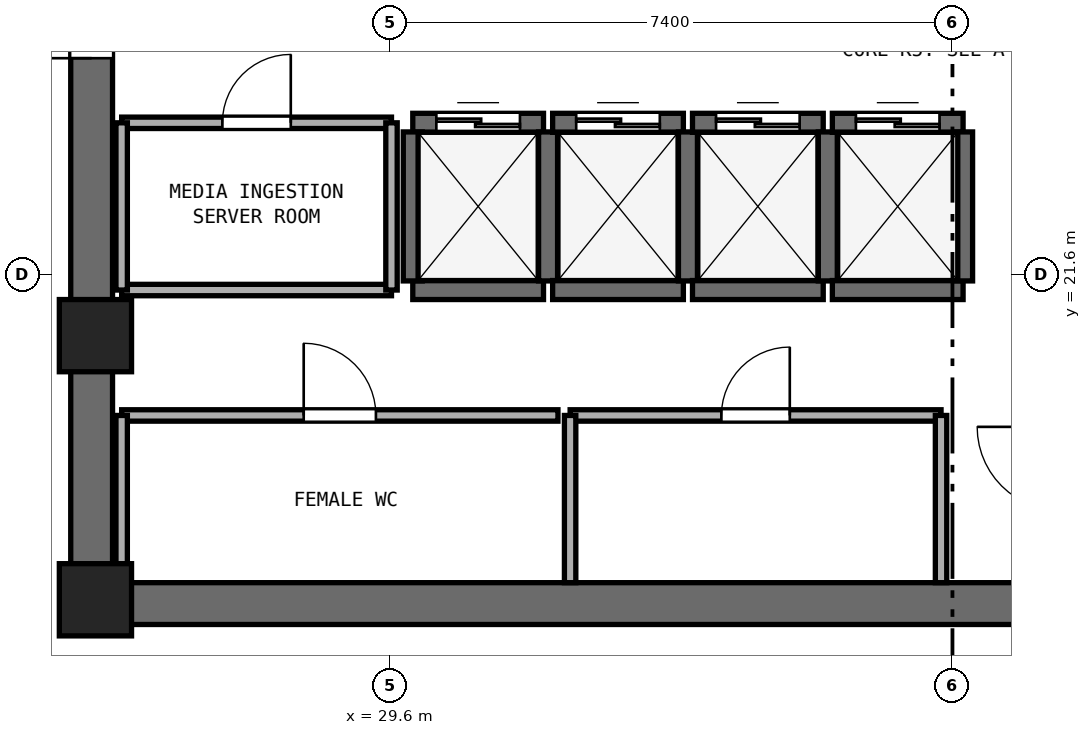
"""IFC4 building model, lengths in metres.
Left out: names, types, materials, properties, quantities, classifications, styles, units other than length and angle.
Written with IfcOpenShell. Run it as: python <this file> out.ifc"""

import sys

from ifc_helpers import new_model, si_unit, direction, frame, frame_2d, origin, origin_2d, place, context, subcontext, project, spatial, rectangle, extrude, element, fill, save


model = new_model("IFC4")
c1 = context("Model", 3, precision=1e-05, world=origin(), true_north=direction((0.0, 1.0)))
c2 = subcontext(c1, "Body", "Model", "MODEL_VIEW")
j1 = project(units=[si_unit("LENGTHUNIT", "METRE"), si_unit("PLANEANGLEUNIT", "RADIAN")], contexts=[c1])
p1 = place(None, origin())
s1 = spatial("IfcSite", under=j1, at=p1, CompositionType="ELEMENT")
p2 = place(p1, origin())
s2 = spatial("IfcBuilding", under=s1, at=p2, CompositionType="ELEMENT")
p3 = place(p2, frame((0.0, 0.0, 136.4)))
s3 = spatial("IfcBuildingStorey", under=s2, at=p3, CompositionType="ELEMENT", Elevation=136.4)
p4 = place(p3, frame((25.4, 17.275, 0.0), z_axis=(0.0, 0.0, 1.0), x_axis=(1.0, 0.0, 0.0)))
e1 = element("IfcWall", 1, at=p4, inside=s3, PredefinedType="SHEAR", context=c2, shape_type="SweptSolid", body=[
    extrude(rectangle(XDim=23.2, YDim=0.55, at=frame_2d((11.6, 0.0))), origin(), (0.0, 0.0, 1.0), 3.54),
])
p5 = place(p3, frame((25.675, 17.55, 0.0), z_axis=(0.0, 0.0, 1.0), x_axis=(0.0, 1.0, 0.0)))
e2 = element("IfcWall", 2, at=p5, inside=s3, PredefinedType="SHEAR", context=c2, shape_type="SweptSolid", body=[
    extrude(rectangle(XDim=15.3, YDim=0.55, at=frame_2d((7.65, 0.0))), origin(), (0.0, 0.0, 1.0), 3.54),
])
p6 = place(p5, frame((6.9, 0.0, 0.0)))
e3 = element("IfcOpeningElement", 3, at=p6, cuts=e2, PredefinedType="OPENING", context=c2, shape_type="SweptSolid", body=[
    extrude(rectangle(XDim=1.5, YDim=2.15, at=frame_2d((0.75, 1.075))), frame((0.0, 0.285, 0.0), z_axis=(0.0, -1.0, 0.0), x_axis=(1.0, 0.0, 0.0)), (0.0, 0.0, 1.0), 0.57),
])
for number, where, z_axis, x_axis in (
    (4, (25.725, 17.325, 0.0), (0.0, 0.0, 1.0), (1.0, 0.0, 0.0)),
    (5, (25.725, 20.8, 0.0), (0.0, 0.0, 1.0), (1.0, 0.0, 0.0)),
):
    element("IfcColumn", number, at=place(p3, frame(where, z_axis=z_axis, x_axis=x_axis)), inside=s3, PredefinedType="PILASTER", context=c2, shape_type="SweptSolid", body=[
        extrude(rectangle(XDim=0.95, YDim=0.95, at=origin_2d()), origin(), (0.0, 0.0, 1.0), 3.8),
    ])
p7 = place(p3, frame((29.9, 21.4, 0.0), z_axis=(0.0, 0.0, 1.0), x_axis=(1.0, 0.0, 0.0)))
e6 = element("IfcWall", 6, at=p7, inside=s3, PredefinedType="SHEAR", context=c2, shape_type="SweptSolid", body=[
    extrude(rectangle(XDim=1.72, YDim=0.25, at=frame_2d((0.86, 0.0))), origin(), (0.0, 0.0, 1.0), 3.54),
])
p8 = place(p3, frame((29.9, 23.6, 0.0), z_axis=(0.0, 0.0, 1.0), x_axis=(1.0, 0.0, 0.0)))
e7 = element("IfcWall", 7, at=p8, inside=s3, PredefinedType="SHEAR", context=c2, shape_type="SweptSolid", body=[
    extrude(rectangle(XDim=1.72, YDim=0.25, at=frame_2d((0.86, 0.0))), origin(), (0.0, 0.0, 1.0), 3.54),
])
p9 = place(p8, frame((0.31, 0.0, 0.0)))
e8 = element("IfcOpeningElement", 8, at=p9, cuts=e7, PredefinedType="OPENING", context=c2, shape_type="SweptSolid", body=[
    extrude(rectangle(XDim=1.1, YDim=2.15, at=frame_2d((0.55, 1.075))), frame((0.0, 0.135, 0.0), z_axis=(0.0, -1.0, 0.0), x_axis=(1.0, 0.0, 0.0)), (0.0, 0.0, 1.0), 0.27),
])
for number, where, z_axis, x_axis in (
    (9, (29.9, 21.52, 0.0), (0.0, 0.0, 1.0), (0.0, 1.0, 0.0)),
    (10, (31.68, 21.52, 0.0), (0.0, 0.0, 1.0), (0.0, 1.0, 0.0)),
):
    element("IfcWall", number, at=place(p3, frame(where, z_axis=z_axis, x_axis=x_axis)), inside=s3, PredefinedType="SHEAR", context=c2, shape_type="SweptSolid", body=[
        extrude(rectangle(XDim=1.96, YDim=0.25, at=frame_2d((0.98, 0.0))), origin(), (0.0, 0.0, 1.0), 3.54),
    ])
p10 = place(p3, frame((31.74, 21.4, 0.0), z_axis=(0.0, 0.0, 1.0), x_axis=(1.0, 0.0, 0.0)))
e11 = element("IfcWall", 11, at=p10, inside=s3, PredefinedType="SHEAR", context=c2, shape_type="SweptSolid", body=[
    extrude(rectangle(XDim=1.72, YDim=0.25, at=frame_2d((0.86, 0.0))), origin(), (0.0, 0.0, 1.0), 3.54),
])
p11 = place(p3, frame((31.74, 23.6, 0.0), z_axis=(0.0, 0.0, 1.0), x_axis=(1.0, 0.0, 0.0)))
e12 = element("IfcWall", 12, at=p11, inside=s3, PredefinedType="SHEAR", context=c2, shape_type="SweptSolid", body=[
    extrude(rectangle(XDim=1.72, YDim=0.25, at=frame_2d((0.86, 0.0))), origin(), (0.0, 0.0, 1.0), 3.54),
])
p12 = place(p11, frame((0.31, 0.0, 0.0)))
e13 = element("IfcOpeningElement", 13, at=p12, cuts=e12, PredefinedType="OPENING", context=c2, shape_type="SweptSolid", body=[
    extrude(rectangle(XDim=1.1, YDim=2.15, at=frame_2d((0.55, 1.075))), frame((0.0, 0.135, 0.0), z_axis=(0.0, -1.0, 0.0), x_axis=(1.0, 0.0, 0.0)), (0.0, 0.0, 1.0), 0.27),
])
p13 = place(p3, frame((33.52, 21.52, 0.0), z_axis=(0.0, 0.0, 1.0), x_axis=(0.0, 1.0, 0.0)))
e14 = element("IfcWall", 14, at=p13, inside=s3, PredefinedType="SHEAR", context=c2, shape_type="SweptSolid", body=[
    extrude(rectangle(XDim=1.96, YDim=0.25, at=frame_2d((0.98, 0.0))), origin(), (0.0, 0.0, 1.0), 3.54),
])
p14 = place(p3, frame((33.58, 21.4, 0.0), z_axis=(0.0, 0.0, 1.0), x_axis=(1.0, 0.0, 0.0)))
e15 = element("IfcWall", 15, at=p14, inside=s3, PredefinedType="SHEAR", context=c2, shape_type="SweptSolid", body=[
    extrude(rectangle(XDim=1.72, YDim=0.25, at=frame_2d((0.86, 0.0))), origin(), (0.0, 0.0, 1.0), 3.54),
])
p15 = place(p3, frame((33.58, 23.6, 0.0), z_axis=(0.0, 0.0, 1.0), x_axis=(1.0, 0.0, 0.0)))
e16 = element("IfcWall", 16, at=p15, inside=s3, PredefinedType="SHEAR", context=c2, shape_type="SweptSolid", body=[
    extrude(rectangle(XDim=1.72, YDim=0.25, at=frame_2d((0.86, 0.0))), origin(), (0.0, 0.0, 1.0), 3.54),
])
p16 = place(p15, frame((0.31, 0.0, 0.0)))
e17 = element("IfcOpeningElement", 17, at=p16, cuts=e16, PredefinedType="OPENING", context=c2, shape_type="SweptSolid", body=[
    extrude(rectangle(XDim=1.1, YDim=2.15, at=frame_2d((0.55, 1.075))), frame((0.0, 0.135, 0.0), z_axis=(0.0, -1.0, 0.0), x_axis=(1.0, 0.0, 0.0)), (0.0, 0.0, 1.0), 0.27),
])
p17 = place(p3, frame((35.36, 21.52, 0.0), z_axis=(0.0, 0.0, 1.0), x_axis=(0.0, 1.0, 0.0)))
e18 = element("IfcWall", 18, at=p17, inside=s3, PredefinedType="SHEAR", context=c2, shape_type="SweptSolid", body=[
    extrude(rectangle(XDim=1.96, YDim=0.25, at=frame_2d((0.98, 0.0))), origin(), (0.0, 0.0, 1.0), 3.54),
])
p18 = place(p3, frame((35.42, 21.4, 0.0), z_axis=(0.0, 0.0, 1.0), x_axis=(1.0, 0.0, 0.0)))
e19 = element("IfcWall", 19, at=p18, inside=s3, PredefinedType="SHEAR", context=c2, shape_type="SweptSolid", body=[
    extrude(rectangle(XDim=1.72, YDim=0.25, at=frame_2d((0.86, 0.0))), origin(), (0.0, 0.0, 1.0), 3.54),
])
p19 = place(p3, frame((35.42, 23.6, 0.0), z_axis=(0.0, 0.0, 1.0), x_axis=(1.0, 0.0, 0.0)))
e20 = element("IfcWall", 20, at=p19, inside=s3, PredefinedType="SHEAR", context=c2, shape_type="SweptSolid", body=[
    extrude(rectangle(XDim=1.72, YDim=0.25, at=frame_2d((0.86, 0.0))), origin(), (0.0, 0.0, 1.0), 3.54),
])
p20 = place(p19, frame((0.31, 0.0, 0.0)))
e21 = element("IfcOpeningElement", 21, at=p20, cuts=e20, PredefinedType="OPENING", context=c2, shape_type="SweptSolid", body=[
    extrude(rectangle(XDim=1.1, YDim=2.15, at=frame_2d((0.55, 1.075))), frame((0.0, 0.135, 0.0), z_axis=(0.0, -1.0, 0.0), x_axis=(1.0, 0.0, 0.0)), (0.0, 0.0, 1.0), 0.27),
])
p21 = place(p3, frame((37.14, 21.52, 0.0), z_axis=(0.0, 0.0, 1.0), x_axis=(0.0, 1.0, 0.0)))
e22 = element("IfcWall", 22, at=p21, inside=s3, PredefinedType="SHEAR", context=c2, shape_type="SweptSolid", body=[
    extrude(rectangle(XDim=1.96, YDim=0.25, at=frame_2d((0.98, 0.0))), origin(), (0.0, 0.0, 1.0), 3.54),
])
p22 = place(p3, frame((26.07, 19.75, 0.0), z_axis=(0.0, 0.0, 1.0), x_axis=(1.0, 0.0, 0.0)))
e23 = element("IfcWall", 23, at=p22, inside=s3, PredefinedType="PARTITIONING", context=c2, shape_type="SweptSolid", body=[
    extrude(rectangle(XDim=5.74, YDim=0.15, at=frame_2d((2.87, 0.0))), origin(), (0.0, 0.0, 1.0), 3.54),
])
p23 = place(p22, frame((2.395, 0.0, 0.0)))
e24 = element("IfcOpeningElement", 24, at=p23, cuts=e23, PredefinedType="OPENING", context=c2, shape_type="SweptSolid", body=[
    extrude(rectangle(XDim=0.95, YDim=2.1, at=frame_2d((0.475, 1.05))), frame((0.0, 0.085, 0.0), z_axis=(0.0, -1.0, 0.0), x_axis=(1.0, 0.0, 0.0)), (0.0, 0.0, 1.0), 0.17),
])
p24 = place(p3, frame((26.07, 17.55, 0.0), z_axis=(0.0, 0.0, 1.0), x_axis=(0.0, 1.0, 0.0)))
e25 = element("IfcWall", 25, at=p24, inside=s3, PredefinedType="PARTITIONING", context=c2, shape_type="SweptSolid", body=[
    extrude(rectangle(XDim=2.2, YDim=0.15, at=frame_2d((1.1, 0.0))), origin(), (0.0, 0.0, 1.0), 2.64),
])
p25 = place(p3, frame((31.97, 19.75, 0.0), z_axis=(0.0, 0.0, 1.0), x_axis=(1.0, 0.0, 0.0)))
e26 = element("IfcWall", 26, at=p25, inside=s3, PredefinedType="PARTITIONING", context=c2, shape_type="SweptSolid", body=[
    extrude(rectangle(XDim=4.88, YDim=0.15, at=frame_2d((2.44, 0.0))), origin(), (0.0, 0.0, 1.0), 3.54),
])
p26 = place(p25, frame((1.99, 0.0, 0.0)))
e27 = element("IfcOpeningElement", 27, at=p26, cuts=e26, PredefinedType="OPENING", context=c2, shape_type="SweptSolid", body=[
    extrude(rectangle(XDim=0.9, YDim=2.1, at=frame_2d((0.45, 1.05))), frame((0.0, 0.085, 0.0), z_axis=(0.0, -1.0, 0.0), x_axis=(1.0, 0.0, 0.0)), (0.0, 0.0, 1.0), 0.17),
])
for number, where, z_axis, x_axis in (
    (28, (31.97, 17.55, 0.0), (0.0, 0.0, 1.0), (0.0, 1.0, 0.0)),
    (29, (36.85, 17.55, 0.0), (0.0, 0.0, 1.0), (0.0, 1.0, 0.0)),
):
    element("IfcWall", number, at=place(p3, frame(where, z_axis=z_axis, x_axis=x_axis)), inside=s3, PredefinedType="PARTITIONING", context=c2, shape_type="SweptSolid", body=[
        extrude(rectangle(XDim=2.2, YDim=0.15, at=frame_2d((1.1, 0.0))), origin(), (0.0, 0.0, 1.0), 3.54),
    ])
p27 = place(p3, frame((26.07, 21.4, 0.0), z_axis=(0.0, 0.0, 1.0), x_axis=(1.0, 0.0, 0.0)))
e30 = element("IfcWall", 30, at=p27, inside=s3, PredefinedType="PARTITIONING", context=c2, shape_type="SweptSolid", body=[
    extrude(rectangle(XDim=3.55, YDim=0.15, at=frame_2d((1.775, 0.0))), origin(), (0.0, 0.0, 1.0), 3.54),
])
p28 = place(p3, frame((26.07, 23.6, 0.0), z_axis=(0.0, 0.0, 1.0), x_axis=(1.0, 0.0, 0.0)))
e31 = element("IfcWall", 31, at=p28, inside=s3, PredefinedType="PARTITIONING", context=c2, shape_type="SweptSolid", body=[
    extrude(rectangle(XDim=3.55, YDim=0.15, at=frame_2d((1.775, 0.0))), origin(), (0.0, 0.0, 1.0), 3.54),
])
p29 = place(p28, frame((1.325, 0.0, 0.0)))
e32 = element("IfcOpeningElement", 32, at=p29, cuts=e31, PredefinedType="OPENING", context=c2, shape_type="SweptSolid", body=[
    extrude(rectangle(XDim=0.9, YDim=2.1, at=frame_2d((0.45, 1.05))), frame((0.0, 0.085, 0.0), z_axis=(0.0, -1.0, 0.0), x_axis=(1.0, 0.0, 0.0)), (0.0, 0.0, 1.0), 0.17),
])
p30 = place(p3, frame((26.07, 21.4, 0.0), z_axis=(0.0, 0.0, 1.0), x_axis=(0.0, 1.0, 0.0)))
e33 = element("IfcWall", 33, at=p30, inside=s3, PredefinedType="PARTITIONING", context=c2, shape_type="SweptSolid", body=[
    extrude(rectangle(XDim=2.2, YDim=0.15, at=frame_2d((1.1, 0.0))), origin(), (0.0, 0.0, 1.0), 2.64),
])
p31 = place(p3, frame((29.62, 21.4, 0.0), z_axis=(0.0, 0.0, 1.0), x_axis=(0.0, 1.0, 0.0)))
e34 = element("IfcWall", 34, at=p31, inside=s3, PredefinedType="PARTITIONING", context=c2, shape_type="SweptSolid", body=[
    extrude(rectangle(XDim=2.2, YDim=0.15, at=frame_2d((1.1, 0.0))), origin(), (0.0, 0.0, 1.0), 3.54),
])
p32 = place(p9, origin())
e35 = element("IfcDoor", 35, at=p32, inside=s3, OperationType="DOUBLE_DOOR_SLIDING", PredefinedType="DOOR", context=c2, shape_type="SweptSolid", body=[
    extrude(rectangle(XDim=1.1, YDim=2.15, at=frame_2d((0.55, 1.075))), frame((0.0, 0.025, 0.0), z_axis=(0.0, -1.0, 0.0), x_axis=(1.0, 0.0, 0.0)), (0.0, 0.0, 1.0), 0.05),
])
fill(e8, e35)
p33 = place(p12, origin())
e36 = element("IfcDoor", 36, at=p33, inside=s3, OperationType="DOUBLE_DOOR_SLIDING", PredefinedType="DOOR", context=c2, shape_type="SweptSolid", body=[
    extrude(rectangle(XDim=1.1, YDim=2.15, at=frame_2d((0.55, 1.075))), frame((0.0, 0.025, 0.0), z_axis=(0.0, -1.0, 0.0), x_axis=(1.0, 0.0, 0.0)), (0.0, 0.0, 1.0), 0.05),
])
fill(e13, e36)
p34 = place(p16, origin())
e37 = element("IfcDoor", 37, at=p34, inside=s3, OperationType="DOUBLE_DOOR_SLIDING", PredefinedType="DOOR", context=c2, shape_type="SweptSolid", body=[
    extrude(rectangle(XDim=1.1, YDim=2.15, at=frame_2d((0.55, 1.075))), frame((0.0, 0.025, 0.0), z_axis=(0.0, -1.0, 0.0), x_axis=(1.0, 0.0, 0.0)), (0.0, 0.0, 1.0), 0.05),
])
fill(e17, e37)
p35 = place(p20, origin())
e38 = element("IfcDoor", 38, at=p35, inside=s3, OperationType="DOUBLE_DOOR_SLIDING", PredefinedType="DOOR", context=c2, shape_type="SweptSolid", body=[
    extrude(rectangle(XDim=1.1, YDim=2.15, at=frame_2d((0.55, 1.075))), frame((0.0, 0.025, 0.0), z_axis=(0.0, -1.0, 0.0), x_axis=(1.0, 0.0, 0.0)), (0.0, 0.0, 1.0), 0.05),
])
fill(e21, e38)
p36 = place(p6, origin())
e39 = element("IfcDoor", 39, at=p36, inside=s3, OperationType="DOUBLE_DOOR_SINGLE_SWING", PredefinedType="DOOR", context=c2, shape_type="SweptSolid", body=[
    extrude(rectangle(XDim=1.5, YDim=2.15, at=frame_2d((0.75, 1.075))), frame((0.0, 0.025, 0.0), z_axis=(0.0, -1.0, 0.0), x_axis=(1.0, 0.0, 0.0)), (0.0, 0.0, 1.0), 0.05),
])
fill(e3, e39)
p37 = place(p23, origin())
e40 = element("IfcDoor", 40, at=p37, inside=s3, OperationType="SINGLE_SWING_LEFT", PredefinedType="DOOR", context=c2, shape_type="SweptSolid", body=[
    extrude(rectangle(XDim=0.95, YDim=2.1, at=frame_2d((0.475, 1.05))), frame((0.0, 0.025, 0.0), z_axis=(0.0, -1.0, 0.0), x_axis=(1.0, 0.0, 0.0)), (0.0, 0.0, 1.0), 0.05),
])
fill(e24, e40)
p38 = place(p26, origin())
e41 = element("IfcDoor", 41, at=p38, inside=s3, OperationType="SINGLE_SWING_RIGHT", PredefinedType="DOOR", context=c2, shape_type="SweptSolid", body=[
    extrude(rectangle(XDim=0.9, YDim=2.1, at=frame_2d((0.45, 1.05))), frame((0.0, 0.025, 0.0), z_axis=(0.0, -1.0, 0.0), x_axis=(1.0, 0.0, 0.0)), (0.0, 0.0, 1.0), 0.05),
])
fill(e27, e41)
p39 = place(p29, origin())
e42 = element("IfcDoor", 42, at=p39, inside=s3, OperationType="SINGLE_SWING_RIGHT", PredefinedType="DOOR", context=c2, shape_type="SweptSolid", body=[
    extrude(rectangle(XDim=0.9, YDim=2.1, at=frame_2d((0.45, 1.05))), frame((0.0, 0.025, 0.0), z_axis=(0.0, -1.0, 0.0), x_axis=(1.0, 0.0, 0.0)), (0.0, 0.0, 1.0), 0.05),
])
fill(e32, e42)
save(model, sys.argv[1])
